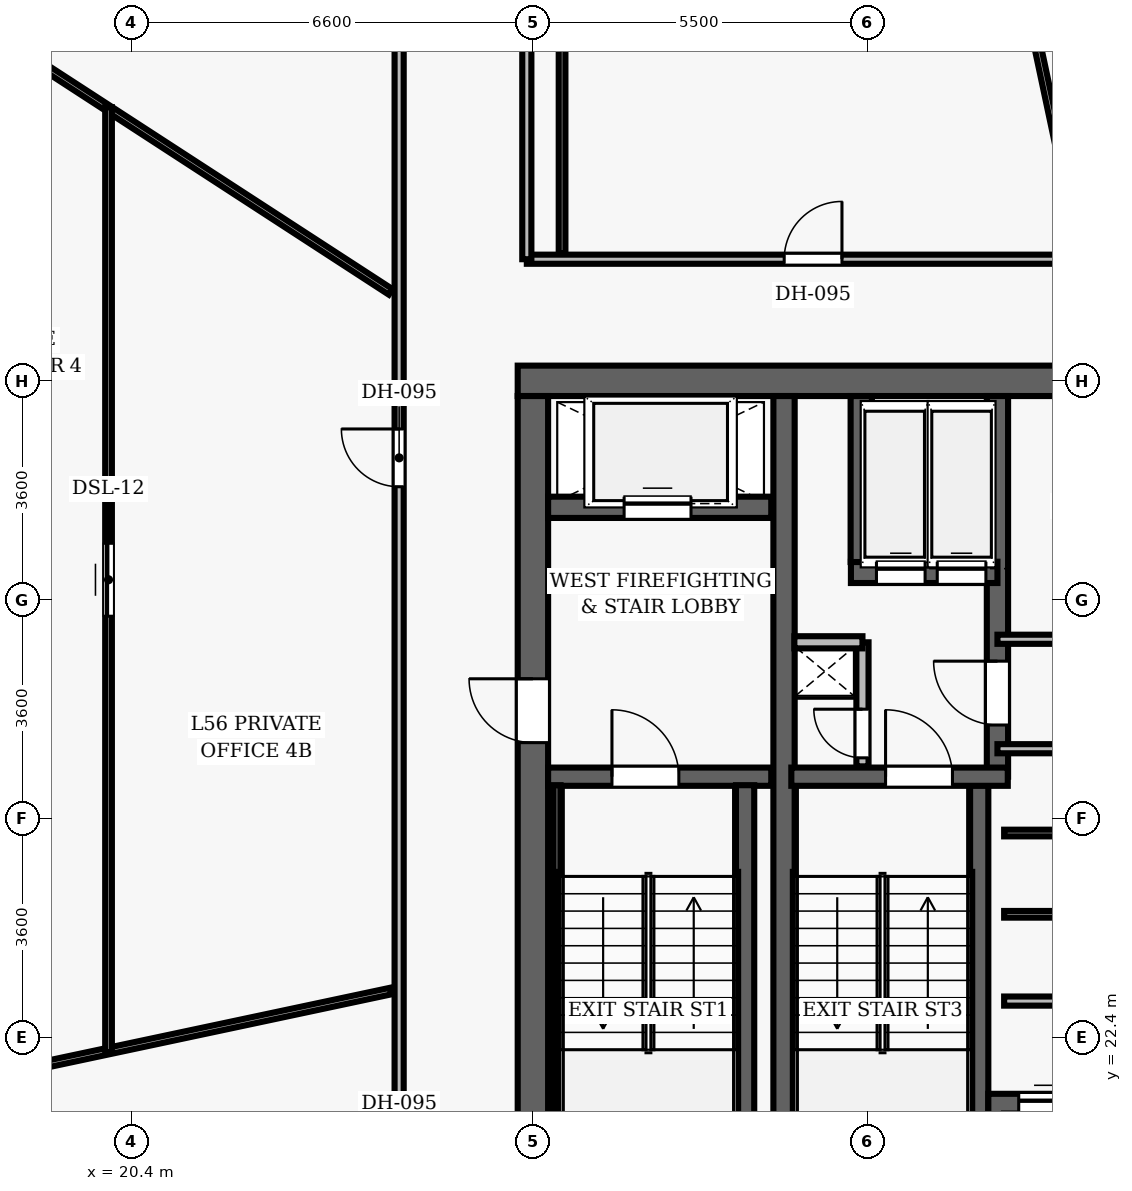
"""IFC4 building model, lengths in metres.
Left out: names, types, materials, properties, quantities, classifications, styles, units other than length and angle.
Written with IfcOpenShell. Run it as: python <this file> out.ifc"""

import sys

from ifc_helpers import new_model, si_unit, direction, frame, frame_2d, origin, place, context, subcontext, project, spatial, rectangle, extrude, element, fill, save


model = new_model("IFC4")
c1 = context("Model", 3, precision=1e-05, world=origin(), true_north=direction((0.0, 1.0)))
c2 = subcontext(c1, "Body", "Model", "MODEL_VIEW")
j1 = project(units=[si_unit("LENGTHUNIT", "METRE"), si_unit("PLANEANGLEUNIT", "RADIAN")], contexts=[c1])
p1 = place(None, origin())
s1 = spatial("IfcSite", under=j1, at=p1, CompositionType="ELEMENT")
p2 = place(p1, origin())
s2 = spatial("IfcBuilding", under=s1, at=p2, CompositionType="ELEMENT")
p3 = place(p2, frame((0.0, 0.0, 221.25)))
s3 = spatial("IfcBuildingStorey", under=s2, at=p3, CompositionType="ELEMENT", Elevation=221.25)
p4 = place(p3, frame((26.75, 33.2, 0.0), z_axis=(0.0, 0.0, 1.0), x_axis=(1.0, 0.0, 0.0)))
e1 = element("IfcWall", 1, at=p4, inside=s3, PredefinedType="SHEAR", context=c2, shape_type="SweptSolid", body=[
    extrude(rectangle(XDim=22.5, YDim=0.5, at=frame_2d((11.25, 0.0))), origin(), (0.0, 0.0, 1.0), 3.85),
])
p5 = place(p3, frame((27.0, 19.05, 0.0), z_axis=(0.0, 0.0, 1.0), x_axis=(0.0, 1.0, 0.0)))
e2 = element("IfcWall", 2, at=p5, inside=s3, PredefinedType="SHEAR", context=c2, shape_type="SweptSolid", body=[
    extrude(rectangle(XDim=13.9, YDim=0.5, at=frame_2d((6.95, 0.0))), origin(), (0.0, 0.0, 1.0), 3.85),
])
p6 = place(p5, frame((8.2, 0.0, 0.0)))
e3 = element("IfcOpeningElement", 3, at=p6, cuts=e2, PredefinedType="OPENING", context=c2, shape_type="SweptSolid", body=[
    extrude(rectangle(XDim=1.05, YDim=2.15, at=frame_2d((0.525, 1.075))), frame((0.0, 0.26, 0.0), z_axis=(0.0, -1.0, 0.0), x_axis=(1.0, 0.0, 0.0)), (0.0, 0.0, 1.0), 0.52),
])
p7 = place(p3, frame((31.13, 19.05, 0.0), z_axis=(0.0, 0.0, 1.0), x_axis=(0.0, 1.0, 0.0)))
e4 = element("IfcWall", 4, at=p7, inside=s3, PredefinedType="SHEAR", context=c2, shape_type="SweptSolid", body=[
    extrude(rectangle(XDim=13.9, YDim=0.35, at=frame_2d((6.95, 0.0))), origin(), (0.0, 0.0, 1.0), 3.85),
])
p8 = place(p3, frame((27.25, 26.69, 0.0), z_axis=(0.0, 0.0, 1.0), x_axis=(1.0, 0.0, 0.0)))
e5 = element("IfcWall", 5, at=p8, inside=s3, PredefinedType="SHEAR", context=c2, shape_type="SweptSolid", body=[
    extrude(rectangle(XDim=3.67, YDim=0.3, at=frame_2d((1.835, 0.0))), origin(), (0.0, 0.0, 1.0), 3.85),
])
p9 = place(p8, frame((1.05, 0.0, 0.0)))
e6 = element("IfcOpeningElement", 6, at=p9, cuts=e5, PredefinedType="OPENING", context=c2, shape_type="SweptSolid", body=[
    extrude(rectangle(XDim=1.1, YDim=2.15, at=frame_2d((0.55, 1.075))), frame((0.0, 0.16, 0.0), z_axis=(0.0, -1.0, 0.0), x_axis=(1.0, 0.0, 0.0)), (0.0, 0.0, 1.0), 0.32),
])
p10 = place(p3, frame((30.49, 19.05, 0.0), z_axis=(0.0, 0.0, 1.0), x_axis=(0.0, 1.0, 0.0)))
e7 = element("IfcWall", 7, at=p10, inside=s3, PredefinedType="SHEAR", context=c2, shape_type="SweptSolid", body=[
    extrude(rectangle(XDim=7.5, YDim=0.3, at=frame_2d((3.75, 0.0))), origin(), (0.0, 0.0, 1.0), 3.85),
])
p11 = place(p3, frame((27.395, 19.1, 0.0), z_axis=(0.0, 0.0, 1.0), x_axis=(0.0, 1.0, 0.0)))
e8 = element("IfcWall", 8, at=p11, inside=s3, PredefinedType="SHEAR", context=c2, shape_type="SweptSolid", body=[
    extrude(rectangle(XDim=7.45, YDim=0.12, at=frame_2d((3.725, 0.0))), origin(), (0.0, 0.0, 1.0), 3.85),
])
p12 = place(p3, frame((27.25, 31.12, 0.0), z_axis=(0.0, 0.0, 1.0), x_axis=(1.0, 0.0, 0.0)))
e9 = element("IfcWall", 9, at=p12, inside=s3, PredefinedType="SHEAR", context=c2, shape_type="SweptSolid", body=[
    extrude(rectangle(XDim=3.67, YDim=0.35, at=frame_2d((1.835, 0.0))), origin(), (0.0, 0.0, 1.0), 3.035),
])
p13 = place(p12, frame((1.25, 0.0, 0.0)))
e10 = element("IfcOpeningElement", 10, at=p13, cuts=e9, PredefinedType="OPENING", context=c2, shape_type="SweptSolid", body=[
    extrude(rectangle(XDim=1.1, YDim=2.15, at=frame_2d((0.55, 1.075))), frame((0.0, 0.185, 0.0), z_axis=(0.0, -1.0, 0.0), x_axis=(1.0, 0.0, 0.0)), (0.0, 0.0, 1.0), 0.37),
])
p14 = place(p3, frame((34.34, 19.05, 0.0), z_axis=(0.0, 0.0, 1.0), x_axis=(0.0, 1.0, 0.0)))
e11 = element("IfcWall", 11, at=p14, inside=s3, PredefinedType="SHEAR", context=c2, shape_type="SweptSolid", body=[
    extrude(rectangle(XDim=7.5, YDim=0.3, at=frame_2d((3.75, 0.0))), origin(), (0.0, 0.0, 1.0), 3.85),
])
p15 = place(p3, frame((34.64, 26.69, 0.0), z_axis=(0.0, 0.0, 1.0), x_axis=(0.0, 1.0, 0.0)))
e12 = element("IfcWall", 12, at=p15, inside=s3, PredefinedType="SHEAR", context=c2, shape_type="SweptSolid", body=[
    extrude(rectangle(XDim=6.26, YDim=0.35, at=frame_2d((3.13, 0.0))), origin(), (0.0, 0.0, 1.0), 3.85),
])
p16 = place(p15, frame((0.85, 0.0, 0.0)))
e13 = element("IfcOpeningElement", 13, at=p16, cuts=e12, PredefinedType="OPENING", context=c2, shape_type="SweptSolid", body=[
    extrude(rectangle(XDim=1.05, YDim=2.15, at=frame_2d((0.525, 1.075))), frame((0.0, 0.185, 0.0), z_axis=(0.0, -1.0, 0.0), x_axis=(1.0, 0.0, 0.0)), (0.0, 0.0, 1.0), 0.37),
])
p17 = place(p3, frame((31.25, 26.69, 0.0), z_axis=(0.0, 0.0, 1.0), x_axis=(1.0, 0.0, 0.0)))
e14 = element("IfcWall", 14, at=p17, inside=s3, PredefinedType="SHEAR", context=c2, shape_type="SweptSolid", body=[
    extrude(rectangle(XDim=3.56, YDim=0.3, at=frame_2d((1.78, 0.0))), origin(), (0.0, 0.0, 1.0), 3.85),
])
p18 = place(p17, frame((1.55, 0.0, 0.0)))
e15 = element("IfcOpeningElement", 15, at=p18, cuts=e14, PredefinedType="OPENING", context=c2, shape_type="SweptSolid", body=[
    extrude(rectangle(XDim=1.1, YDim=2.15, at=frame_2d((0.55, 1.075))), frame((0.0, 0.16, 0.0), z_axis=(0.0, -1.0, 0.0), x_axis=(1.0, 0.0, 0.0)), (0.0, 0.0, 1.0), 0.32),
])
p19 = place(p3, frame((32.23, 30.05, 0.0), z_axis=(0.0, 0.0, 1.0), x_axis=(1.0, 0.0, 0.0)))
e16 = element("IfcWall", 16, at=p19, inside=s3, PredefinedType="SHEAR", context=c2, shape_type="SweptSolid", body=[
    extrude(rectangle(XDim=2.41, YDim=0.35, at=frame_2d((1.205, 0.0))), origin(), (0.0, 0.0, 1.0), 3.035),
])
p20 = place(p19, frame((0.42, 0.0, 0.0)))
e17 = element("IfcOpeningElement", 17, at=p20, cuts=e16, PredefinedType="OPENING", context=c2, shape_type="SweptSolid", body=[
    extrude(rectangle(XDim=0.8, YDim=2.15, at=frame_2d((0.4, 1.075))), frame((0.0, 0.185, 0.0), z_axis=(0.0, -1.0, 0.0), x_axis=(1.0, 0.0, 0.0)), (0.0, 0.0, 1.0), 0.37),
])
p21 = place(p19, frame((1.42, 0.0, 0.0)))
e18 = element("IfcOpeningElement", 18, at=p21, cuts=e16, PredefinedType="OPENING", context=c2, shape_type="SweptSolid", body=[
    extrude(rectangle(XDim=0.8, YDim=2.15, at=frame_2d((0.4, 1.075))), frame((0.0, 0.185, 0.0), z_axis=(0.0, -1.0, 0.0), x_axis=(1.0, 0.0, 0.0)), (0.0, 0.0, 1.0), 0.37),
])
p22 = place(p3, frame((32.4, 30.22, 0.0), z_axis=(0.0, 0.0, 1.0), x_axis=(0.0, 1.0, 0.0)))
e19 = element("IfcWall", 19, at=p22, inside=s3, PredefinedType="SHEAR", context=c2, shape_type="SweptSolid", body=[
    extrude(rectangle(XDim=2.73, YDim=0.35, at=frame_2d((1.365, 0.0))), origin(), (0.0, 0.0, 1.0), 3.035),
])
p23 = place(p3, frame((32.42, 26.86, 0.0), z_axis=(0.0, 0.0, 1.0), x_axis=(0.0, 1.0, 0.0)))
e20 = element("IfcWall", 20, at=p23, inside=s3, PredefinedType="PARTITIONING", context=c2, shape_type="SweptSolid", body=[
    extrude(rectangle(XDim=2.04, YDim=0.2, at=frame_2d((1.02, 0.0))), origin(), (0.0, 0.0, 1.0), 3.035),
])
p24 = place(p23, frame((0.14, 0.0, 0.0)))
e21 = element("IfcOpeningElement", 21, at=p24, cuts=e20, PredefinedType="OPENING", context=c2, shape_type="SweptSolid", body=[
    extrude(rectangle(XDim=0.8, YDim=2.05, at=frame_2d((0.4, 1.025))), frame((0.0, 0.11, 0.0), z_axis=(0.0, -1.0, 0.0), x_axis=(1.0, 0.0, 0.0)), (0.0, 0.0, 1.0), 0.22),
])
p25 = place(p3, frame((31.3, 28.9, 0.0), z_axis=(0.0, 0.0, 1.0), x_axis=(1.0, 0.0, 0.0)))
e22 = element("IfcWall", 22, at=p25, inside=s3, PredefinedType="PARTITIONING", context=c2, shape_type="SweptSolid", body=[
    extrude(rectangle(XDim=1.12, YDim=0.2, at=frame_2d((0.56, 0.0))), origin(), (0.0, 0.0, 1.0), 3.035),
])
p26 = place(p3, frame((34.49, 21.3, 0.0), z_axis=(0.0, 0.0, 1.0), x_axis=(1.0, 0.0, 0.0)))
e23 = element("IfcWall", 23, at=p26, inside=s3, PredefinedType="SHEAR", context=c2, shape_type="SweptSolid", body=[
    extrude(rectangle(XDim=6.68, YDim=0.35, at=frame_2d((3.34, 0.0))), origin(), (0.0, 0.0, 1.0), 3.035),
])
p27 = place(p26, frame((0.5, 0.0, 0.0)))
e24 = element("IfcOpeningElement", 24, at=p27, cuts=e23, PredefinedType="OPENING", context=c2, shape_type="SweptSolid", body=[
    extrude(rectangle(XDim=0.9, YDim=2.15, at=frame_2d((0.45, 1.075))), frame((0.0, 0.185, 0.0), z_axis=(0.0, -1.0, 0.0), x_axis=(1.0, 0.0, 0.0)), (0.0, 0.0, 1.0), 0.37),
])
p28 = place(p26, frame((2.58, 0.0, 0.0)))
e25 = element("IfcOpeningElement", 25, at=p28, cuts=e23, PredefinedType="OPENING", context=c2, shape_type="SweptSolid", body=[
    extrude(rectangle(XDim=0.9, YDim=2.15, at=frame_2d((0.45, 1.075))), frame((0.0, 0.185, 0.0), z_axis=(0.0, -1.0, 0.0), x_axis=(1.0, 0.0, 0.0)), (0.0, 0.0, 1.0), 0.37),
])
p29 = place(p26, frame((4.66, 0.0, 0.0)))
e26 = element("IfcOpeningElement", 26, at=p29, cuts=e23, PredefinedType="OPENING", context=c2, shape_type="SweptSolid", body=[
    extrude(rectangle(XDim=0.9, YDim=2.15, at=frame_2d((0.45, 1.075))), frame((0.0, 0.185, 0.0), z_axis=(0.0, -1.0, 0.0), x_axis=(1.0, 0.0, 0.0)), (0.0, 0.0, 1.0), 0.37),
])
p30 = place(p3, frame((34.75, 23.0, 0.0), z_axis=(0.0, 0.0, 1.0), x_axis=(1.0, 0.0, 0.0)))
e27 = element("IfcWall", 27, at=p30, inside=s3, PredefinedType="PARTITIONING", context=c2, shape_type="SweptSolid", body=[
    extrude(rectangle(XDim=6.25, YDim=0.15, at=frame_2d((3.125, 0.0))), origin(), (0.0, 0.0, 1.0), 3.035),
])
for number, where, z_axis, x_axis in (
    (28, (34.64, 27.15, 0.0), (0.0, 0.0, 1.0), (1.0, 0.0, 0.0)),
    (29, (34.64, 28.95, 0.0), (0.0, 0.0, 1.0), (1.0, 0.0, 0.0)),
):
    element("IfcWall", number, at=place(p3, frame(where, z_axis=z_axis, x_axis=x_axis)), inside=s3, PredefinedType="PARTITIONING", context=c2, shape_type="SweptSolid", body=[
        extrude(rectangle(XDim=6.36, YDim=0.15, at=frame_2d((3.18, 0.0))), origin(), (0.0, 0.0, 1.0), 3.035),
    ])
for number, where, z_axis, x_axis in (
    (30, (34.75, 24.427, 0.0), (0.0, 0.0, 1.0), (1.0, 0.0, 0.0)),
    (31, (34.75, 25.763, 0.0), (0.0, 0.0, 1.0), (1.0, 0.0, 0.0)),
):
    element("IfcWall", number, at=place(p3, frame(where, z_axis=z_axis, x_axis=x_axis)), inside=s3, PredefinedType="PARTITIONING", context=c2, shape_type="SweptSolid", body=[
        extrude(rectangle(XDim=6.25, YDim=0.11, at=frame_2d((3.125, 0.0))), origin(), (0.0, 0.0, 1.0), 3.035),
    ])
p31 = place(p3, frame((26.9, 35.2, 0.0), z_axis=(0.0, 0.0, 1.0), x_axis=(1.0, 0.0, 0.0)))
e32 = element("IfcWall", 32, at=p31, inside=s3, PredefinedType="PARTITIONING", context=c2, shape_type="SweptSolid", body=[
    extrude(rectangle(XDim=10.05, YDim=0.15, at=frame_2d((5.025, 0.0))), origin(), (0.0, 0.0, 1.0), 3.035),
])
p32 = place(p31, frame((4.233, 0.0, 0.0)))
e33 = element("IfcOpeningElement", 33, at=p32, cuts=e32, PredefinedType="OPENING", context=c2, shape_type="SweptSolid", body=[
    extrude(rectangle(XDim=0.95, YDim=2.15, at=frame_2d((0.475, 1.075))), frame((0.0, 0.085, 0.0), z_axis=(0.0, -1.0, 0.0), x_axis=(1.0, 0.0, 0.0)), (0.0, 0.0, 1.0), 0.17),
])
p33 = place(p3, frame((24.8, 10.6, 0.0), z_axis=(0.0, 0.0, 1.0), x_axis=(0.0, 1.0, 0.0)))
e34 = element("IfcWall", 34, at=p33, inside=s3, PredefinedType="PARTITIONING", context=c2, shape_type="SweptSolid", body=[
    extrude(rectangle(XDim=30.8, YDim=0.15, at=frame_2d((15.4, 0.0))), origin(), (0.0, 0.0, 1.0), 3.035),
])
p34 = place(p33, frame((20.858, 0.0, 0.0)))
e35 = element("IfcOpeningElement", 35, at=p34, cuts=e34, PredefinedType="OPENING", context=c2, shape_type="SweptSolid", body=[
    extrude(rectangle(XDim=0.95, YDim=2.15, at=frame_2d((0.475, 1.075))), frame((0.0, 0.085, 0.0), z_axis=(0.0, -1.0, 0.0), x_axis=(1.0, 0.0, 0.0)), (0.0, 0.0, 1.0), 0.17),
])
p35 = place(p33, frame((9.174, 0.0, 0.0)))
e36 = element("IfcOpeningElement", 36, at=p35, cuts=e34, PredefinedType="OPENING", context=c2, shape_type="SweptSolid", body=[
    extrude(rectangle(XDim=0.95, YDim=2.15, at=frame_2d((0.475, 1.075))), frame((0.0, 0.085, 0.0), z_axis=(0.0, -1.0, 0.0), x_axis=(1.0, 0.0, 0.0)), (0.0, 0.0, 1.0), 0.17),
])
p36 = place(p3, frame((26.9, 35.2, 0.0), z_axis=(0.0, 0.0, 1.0), x_axis=(0.0, 1.0, 0.0)))
e37 = element("IfcWall", 37, at=p36, inside=s3, PredefinedType="PARTITIONING", context=c2, shape_type="SweptSolid", body=[
    extrude(rectangle(XDim=6.2, YDim=0.15, at=frame_2d((3.1, 0.0))), origin(), (0.0, 0.0, 1.0), 3.035),
])
p37 = place(p3, frame((36.015, 35.34, 0.0), z_axis=(0.0, 0.0, 1.0), x_axis=(-0.207901362198, 0.978149796093, 0.0)))
e38 = element("IfcWall", 38, at=p37, inside=s3, PredefinedType="PARTITIONING", context=c2, shape_type="SweptSolid", body=[
    extrude(rectangle(XDim=14.117, YDim=0.11, at=frame_2d((7.059, 0.0))), origin(), (0.0, 0.0, 1.0), 3.035),
])
p38 = place(p3, frame((24.66, 34.663, 0.0), z_axis=(0.0, 0.0, 1.0), x_axis=(-0.838669505623, 0.544640670845, 0.0)))
e39 = element("IfcWall", 39, at=p38, inside=s3, PredefinedType="PARTITIONING", context=c2, shape_type="SweptSolid", body=[
    extrude(rectangle(XDim=9.306, YDim=0.11, at=frame_2d((4.653, 0.0))), origin(), (0.0, 0.0, 1.0), 3.035),
])
p39 = place(p3, frame((24.66, 23.165, 0.0), z_axis=(0.0, 0.0, 1.0), x_axis=(-0.978144691983, -0.207925374944, 0.0)))
e40 = element("IfcWall", 40, at=p39, inside=s3, PredefinedType="PARTITIONING", context=c2, shape_type="SweptSolid", body=[
    extrude(rectangle(XDim=8.152, YDim=0.11, at=frame_2d((4.076, 0.0))), origin(), (0.0, 0.0, 1.0), 3.035),
])
p40 = place(p3, frame((27.479, 35.3, 0.0), z_axis=(0.0, 0.0, 1.0), x_axis=(0.0, 1.0, 0.0)))
e41 = element("IfcWall", 41, at=p40, inside=s3, PredefinedType="PARTITIONING", context=c2, shape_type="SweptSolid", body=[
    extrude(rectangle(XDim=13.057, YDim=0.11, at=frame_2d((6.529, 0.0))), origin(), (0.0, 0.0, 1.0), 3.035),
])
p41 = place(p40, frame((5.929, 0.0, 0.0)))
e42 = element("IfcOpeningElement", 42, at=p41, cuts=e41, PredefinedType="OPENING", context=c2, shape_type="SweptSolid", body=[
    extrude(rectangle(XDim=1.2, YDim=2.15, at=frame_2d((0.6, 1.075))), frame((0.0, 0.065, 0.0), z_axis=(0.0, -1.0, 0.0), x_axis=(1.0, 0.0, 0.0)), (0.0, 0.0, 1.0), 0.13),
])
p42 = place(p3, frame((20.021, 22.158, 0.0), z_axis=(0.0, 0.0, 1.0), x_axis=(0.0, 1.0, 0.0)))
e43 = element("IfcWall", 43, at=p42, inside=s3, PredefinedType="PARTITIONING", context=c2, shape_type="SweptSolid", body=[
    extrude(rectangle(XDim=15.542, YDim=0.11, at=frame_2d((7.771, 0.0))), origin(), (0.0, 0.0, 1.0), 3.035),
])
p43 = place(p42, frame((7.171, 0.0, 0.0)))
e44 = element("IfcOpeningElement", 44, at=p43, cuts=e43, PredefinedType="OPENING", context=c2, shape_type="SweptSolid", body=[
    extrude(rectangle(XDim=1.2, YDim=2.15, at=frame_2d((0.6, 1.075))), frame((0.0, 0.065, 0.0), z_axis=(0.0, -1.0, 0.0), x_axis=(1.0, 0.0, 0.0)), (0.0, 0.0, 1.0), 0.13),
])
p44 = place(p9, origin())
e45 = element("IfcDoor", 45, at=p44, inside=s3, OperationType="SINGLE_SWING_LEFT", PredefinedType="DOOR", context=c2, shape_type="SweptSolid", body=[
    extrude(rectangle(XDim=1.1, YDim=2.15, at=frame_2d((0.55, 1.075))), frame((0.0, 0.025, 0.0), z_axis=(0.0, -1.0, 0.0), x_axis=(1.0, 0.0, 0.0)), (0.0, 0.0, 1.0), 0.05),
])
fill(e6, e45)
p45 = place(p6, origin())
e46 = element("IfcDoor", 46, at=p45, inside=s3, OperationType="SINGLE_SWING_RIGHT", PredefinedType="DOOR", context=c2, shape_type="SweptSolid", body=[
    extrude(rectangle(XDim=1.05, YDim=2.15, at=frame_2d((0.525, 1.075))), frame((0.0, 0.025, 0.0), z_axis=(0.0, -1.0, 0.0), x_axis=(1.0, 0.0, 0.0)), (0.0, 0.0, 1.0), 0.05),
])
fill(e3, e46)
p46 = place(p18, origin())
e47 = element("IfcDoor", 47, at=p46, inside=s3, OperationType="SINGLE_SWING_LEFT", PredefinedType="DOOR", context=c2, shape_type="SweptSolid", body=[
    extrude(rectangle(XDim=1.1, YDim=2.15, at=frame_2d((0.55, 1.075))), frame((0.0, 0.025, 0.0), z_axis=(0.0, -1.0, 0.0), x_axis=(1.0, 0.0, 0.0)), (0.0, 0.0, 1.0), 0.05),
])
fill(e15, e47)
p47 = place(p24, origin())
e48 = element("IfcDoor", 48, at=p47, inside=s3, OperationType="SINGLE_SWING_RIGHT", PredefinedType="DOOR", context=c2, shape_type="SweptSolid", body=[
    extrude(rectangle(XDim=0.8, YDim=2.05, at=frame_2d((0.4, 1.025))), frame((0.0, 0.025, 0.0), z_axis=(0.0, -1.0, 0.0), x_axis=(1.0, 0.0, 0.0)), (0.0, 0.0, 1.0), 0.05),
])
fill(e21, e48)
p48 = place(p16, origin())
e49 = element("IfcDoor", 49, at=p48, inside=s3, OperationType="SINGLE_SWING_RIGHT", PredefinedType="DOOR", context=c2, shape_type="SweptSolid", body=[
    extrude(rectangle(XDim=1.05, YDim=2.15, at=frame_2d((0.525, 1.075))), frame((0.0, 0.025, 0.0), z_axis=(0.0, -1.0, 0.0), x_axis=(1.0, 0.0, 0.0)), (0.0, 0.0, 1.0), 0.05),
])
fill(e13, e49)
p49 = place(p32, origin())
e50 = element("IfcDoor", 50, at=p49, inside=s3, OperationType="SINGLE_SWING_RIGHT", PredefinedType="DOOR", context=c2, shape_type="SweptSolid", body=[
    extrude(rectangle(XDim=0.95, YDim=2.15, at=frame_2d((0.475, 1.075))), frame((0.0, 0.025, 0.0), z_axis=(0.0, -1.0, 0.0), x_axis=(1.0, 0.0, 0.0)), (0.0, 0.0, 1.0), 0.05),
])
fill(e33, e50)
p50 = place(p34, origin())
e51 = element("IfcDoor", 51, at=p50, inside=s3, OperationType="SINGLE_SWING_RIGHT", PredefinedType="DOOR", context=c2, shape_type="SweptSolid", body=[
    extrude(rectangle(XDim=0.95, YDim=2.15, at=frame_2d((0.475, 1.075))), frame((0.0, 0.025, 0.0), z_axis=(0.0, -1.0, 0.0), x_axis=(1.0, 0.0, 0.0)), (0.0, 0.0, 1.0), 0.05),
])
fill(e35, e51)
p51 = place(p43, origin())
e52 = element("IfcDoor", 52, at=p51, inside=s3, OperationType="SLIDING_TO_RIGHT", PredefinedType="DOOR", context=c2, shape_type="SweptSolid", body=[
    extrude(rectangle(XDim=1.2, YDim=2.15, at=frame_2d((0.6, 1.075))), frame((0.0, 0.025, 0.0), z_axis=(0.0, -1.0, 0.0), x_axis=(1.0, 0.0, 0.0)), (0.0, 0.0, 1.0), 0.05),
])
fill(e44, e52)
p52 = place(p27, origin())
e53 = element("IfcDoor", 53, at=p52, inside=s3, OperationType="SLIDING_TO_LEFT", PredefinedType="DOOR", context=c2, shape_type="SweptSolid", body=[
    extrude(rectangle(XDim=0.9, YDim=2.15, at=frame_2d((0.45, 1.075))), frame((0.0, 0.025, 0.0), z_axis=(0.0, -1.0, 0.0), x_axis=(1.0, 0.0, 0.0)), (0.0, 0.0, 1.0), 0.05),
])
fill(e24, e53)
p53 = place(p13, origin())
e54 = element("IfcDoor", 54, at=p53, inside=s3, OperationType="SLIDING_TO_LEFT", PredefinedType="DOOR", context=c2, shape_type="SweptSolid", body=[
    extrude(rectangle(XDim=1.1, YDim=2.15, at=frame_2d((0.55, 1.075))), frame((0.0, 0.025, 0.0), z_axis=(0.0, -1.0, 0.0), x_axis=(1.0, 0.0, 0.0)), (0.0, 0.0, 1.0), 0.05),
])
fill(e10, e54)
p54 = place(p20, origin())
e55 = element("IfcDoor", 55, at=p54, inside=s3, OperationType="SLIDING_TO_LEFT", PredefinedType="DOOR", context=c2, shape_type="SweptSolid", body=[
    extrude(rectangle(XDim=0.8, YDim=2.15, at=frame_2d((0.4, 1.075))), frame((0.0, 0.025, 0.0), z_axis=(0.0, -1.0, 0.0), x_axis=(1.0, 0.0, 0.0)), (0.0, 0.0, 1.0), 0.05),
])
fill(e17, e55)
p55 = place(p21, origin())
e56 = element("IfcDoor", 56, at=p55, inside=s3, OperationType="SLIDING_TO_LEFT", PredefinedType="DOOR", context=c2, shape_type="SweptSolid", body=[
    extrude(rectangle(XDim=0.8, YDim=2.15, at=frame_2d((0.4, 1.075))), frame((0.0, 0.025, 0.0), z_axis=(0.0, -1.0, 0.0), x_axis=(1.0, 0.0, 0.0)), (0.0, 0.0, 1.0), 0.05),
])
fill(e18, e56)
save(model, sys.argv[1])
